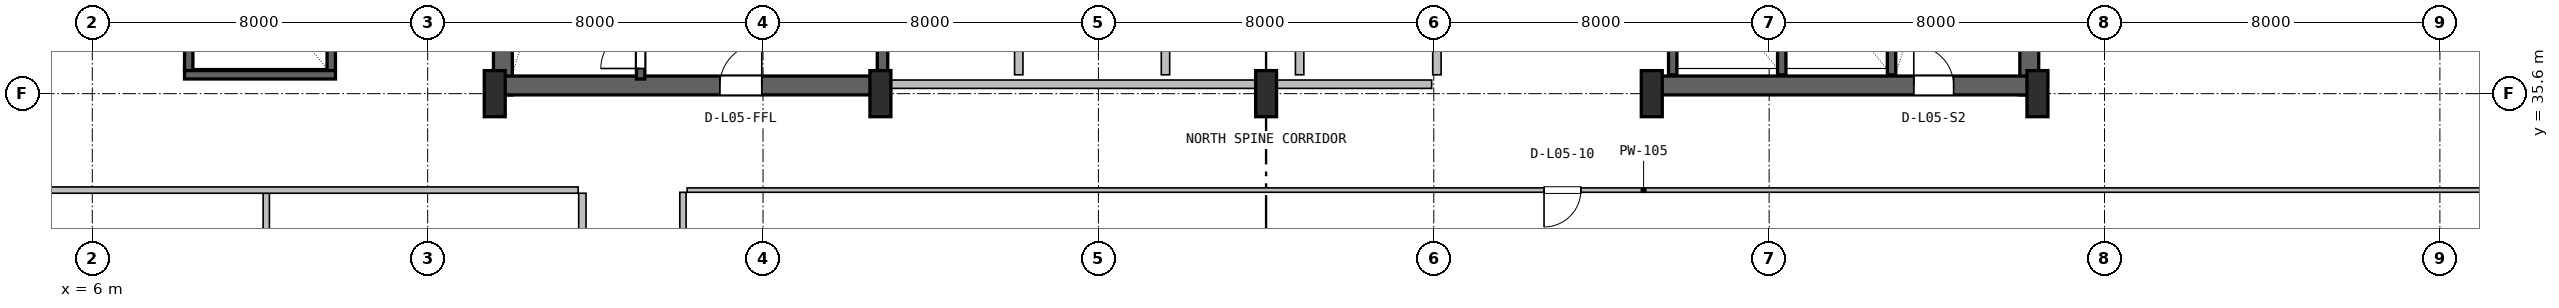
"""IFC4 building model, lengths in metres.
Left out: names, types, materials, properties, quantities, classifications, styles, units other than length and angle.
Written with IfcOpenShell. Run it as: python <this file> out.ifc"""

import sys

from ifc_helpers import new_model, si_unit, direction, frame, frame_2d, origin, origin_2d, place, context, subcontext, project, spatial, rectangle, i_section, extrude, source, transform, mapped, element, fill, save


model = new_model("IFC4")
c1 = context("Model", 3, precision=1e-05, world=origin(), true_north=direction((0.0, 1.0)))
c2 = subcontext(c1, "Body", "Model", "MODEL_VIEW")
j1 = project(units=[si_unit("LENGTHUNIT", "METRE"), si_unit("PLANEANGLEUNIT", "RADIAN")], contexts=[c1])
p1 = place(None, origin())
s1 = spatial("IfcSite", under=j1, at=p1, CompositionType="ELEMENT")
p2 = place(p1, origin())
s2 = spatial("IfcBuilding", under=s1, at=p2, CompositionType="ELEMENT")
p3 = place(p2, frame((0.0, 0.0, 27.6)))
s3 = spatial("IfcBuildingStorey", under=s2, at=p3, CompositionType="ELEMENT", Elevation=27.6)
for number, where, z_axis, x_axis in (
    (1, (15.795, 35.57, 0.0), (0.0, 0.0, 1.0), (0.0, 1.0, 0.0)),
    (2, (52.205, 35.57, 0.0), (0.0, 0.0, 1.0), (0.0, 1.0, 0.0)),
):
    element("IfcWall", number, at=place(p3, frame(where, z_axis=z_axis, x_axis=x_axis)), inside=s3, PredefinedType="SHEAR", context=c2, shape_type="SweptSolid", body=[
        extrude(rectangle(XDim=11.23, YDim=0.45, at=frame_2d((5.615, 0.0))), origin(), (0.0, 0.0, 1.0), 3.65),
    ])
p4 = place(p3, frame((15.57, 35.795, 0.0), z_axis=(0.0, 0.0, 1.0), x_axis=(1.0, 0.0, 0.0)))
e3 = element("IfcWall", 3, at=p4, inside=s3, PredefinedType="SHEAR", context=c2, shape_type="SweptSolid", body=[
    extrude(rectangle(XDim=9.23, YDim=0.45, at=frame_2d((4.615, 0.0))), origin(), (0.0, 0.0, 1.0), 3.65),
])
p5 = place(p4, frame((5.4, 0.0, 0.0)))
e4 = element("IfcOpeningElement", 4, at=p5, cuts=e3, PredefinedType="OPENING", context=c2, shape_type="SweptSolid", body=[
    extrude(rectangle(XDim=1.0, YDim=2.1, at=frame_2d((0.5, 1.05))), frame((0.0, 0.235, 0.0), z_axis=(0.0, -1.0, 0.0), x_axis=(1.0, 0.0, 0.0)), (0.0, 0.0, 1.0), 0.47),
])
p6 = place(p3, frame((43.2, 35.795, 0.0), z_axis=(0.0, 0.0, 1.0), x_axis=(1.0, 0.0, 0.0)))
e5 = element("IfcWall", 5, at=p6, inside=s3, PredefinedType="SHEAR", context=c2, shape_type="SweptSolid", body=[
    extrude(rectangle(XDim=9.23, YDim=0.45, at=frame_2d((4.615, 0.0))), origin(), (0.0, 0.0, 1.0), 3.65),
])
p7 = place(p6, frame((6.25, 0.0, 0.0)))
e6 = element("IfcOpeningElement", 6, at=p7, cuts=e5, PredefinedType="OPENING", context=c2, shape_type="SweptSolid", body=[
    extrude(rectangle(XDim=0.95, YDim=2.1, at=frame_2d((0.475, 1.05))), frame((0.0, 0.235, 0.0), z_axis=(0.0, -1.0, 0.0), x_axis=(1.0, 0.0, 0.0)), (0.0, 0.0, 1.0), 0.47),
])
m1 = source(origin(), c2, "Body", "SweptSolid", [
    extrude(i_section(OverallWidth=0.5, OverallDepth=1.1, WebThickness=0.018, FlangeThickness=0.032, FilletRadius=0.018, at=origin_2d()), origin(), (0.0, 0.0, 1.0), 3.9),
])
for number, where, z_axis, x_axis in (
    (7, (15.6, 35.6, 0.0), (0.0, 0.0, 1.0), (1.0, 0.0, 0.0)),
    (8, (24.8, 35.6, 0.0), (0.0, 0.0, 1.0), (1.0, 0.0, 0.0)),
    (9, (34.0, 35.6, 0.0), (0.0, 0.0, 1.0), (1.0, 0.0, 0.0)),
    (10, (43.2, 35.6, 0.0), (0.0, 0.0, 1.0), (1.0, 0.0, 0.0)),
    (11, (52.4, 35.6, 0.0), (0.0, 0.0, 1.0), (1.0, 0.0, 0.0)),
):
    element("IfcColumn", number, at=place(p3, frame(where, z_axis=z_axis, x_axis=x_axis)), inside=s3, PredefinedType="COLUMN", context=c2, shape_type="MappedRepresentation", body=[
        mapped(m1, transform((0.0, 0.0, 0.0), x_axis=(1.0, 0.0, 0.0), y_axis=(0.0, 1.0, 0.0), z_axis=(0.0, 0.0, 1.0), scale=1.0)),
    ])
p8 = place(p3, frame((19.08, 35.95, 0.0), z_axis=(0.0, 0.0, 1.0), x_axis=(0.0, 1.0, 0.0)))
e12 = element("IfcWall", 12, at=p8, inside=s3, PredefinedType="SHEAR", context=c2, shape_type="SweptSolid", body=[
    extrude(rectangle(XDim=9.65, YDim=0.2, at=frame_2d((4.825, 0.0))), origin(), (0.0, 0.0, 1.0), 3.65),
])
p9 = place(p8, frame((0.25, 0.0, 0.0)))
e13 = element("IfcOpeningElement", 13, at=p9, cuts=e12, PredefinedType="OPENING", context=c2, shape_type="SweptSolid", body=[
    extrude(rectangle(XDim=0.95, YDim=2.1, at=frame_2d((0.475, 1.05))), frame((0.0, 0.11, 0.0), z_axis=(0.0, -1.0, 0.0), x_axis=(1.0, 0.0, 0.0)), (0.0, 0.0, 1.0), 0.22),
])
p10 = place(p3, frame((24.85, 36.05, 0.0), z_axis=(0.0, 0.0, 1.0), x_axis=(0.0, 1.0, 0.0)))
e14 = element("IfcWall", 14, at=p10, inside=s3, PredefinedType="SHEAR", context=c2, shape_type="SweptSolid", body=[
    extrude(rectangle(XDim=10.45, YDim=0.25, at=frame_2d((5.225, 0.0))), origin(), (0.0, 0.0, 1.0), 3.65),
])
p11 = place(p3, frame((48.92, 36.05, 0.0), z_axis=(0.0, 0.0, 1.0), x_axis=(0.0, 1.0, 0.0)))
e15 = element("IfcWall", 15, at=p11, inside=s3, PredefinedType="SHEAR", context=c2, shape_type="SweptSolid", body=[
    extrude(rectangle(XDim=10.5, YDim=0.2, at=frame_2d((5.25, 0.0))), origin(), (0.0, 0.0, 1.0), 3.65),
])
for number, where, z_axis, x_axis in (
    (16, (43.7, 36.05, 0.0), (0.0, 0.0, 1.0), (0.0, 1.0, 0.0)),
    (17, (46.3, 36.05, 0.0), (0.0, 0.0, 1.0), (0.0, 1.0, 0.0)),
):
    element("IfcWall", number, at=place(p3, frame(where, z_axis=z_axis, x_axis=x_axis)), inside=s3, PredefinedType="SHEAR", context=c2, shape_type="SweptSolid", body=[
        extrude(rectangle(XDim=3.05, YDim=0.2, at=frame_2d((1.525, 0.0))), origin(), (0.0, 0.0, 1.0), 3.65),
    ])
for number, where, z_axis, x_axis in (
    (18, (8.3, 36.15, 0.0), (0.0, 0.0, 1.0), (0.0, 1.0, 0.0)),
    (19, (11.7, 36.15, 0.0), (0.0, 0.0, 1.0), (0.0, 1.0, 0.0)),
):
    element("IfcWall", number, at=place(p3, frame(where, z_axis=z_axis, x_axis=x_axis)), inside=s3, PredefinedType="SHEAR", context=c2, shape_type="SweptSolid", body=[
        extrude(rectangle(XDim=3.85, YDim=0.2, at=frame_2d((1.925, 0.0))), origin(), (0.0, 0.0, 1.0), 3.65),
    ])
p12 = place(p3, frame((8.2, 36.05, 0.0), z_axis=(0.0, 0.0, 1.0), x_axis=(1.0, 0.0, 0.0)))
e20 = element("IfcWall", 20, at=p12, inside=s3, PredefinedType="SHEAR", context=c2, shape_type="SweptSolid", body=[
    extrude(rectangle(XDim=3.6, YDim=0.2, at=frame_2d((1.8, 0.0))), origin(), (0.0, 0.0, 1.0), 3.65),
])
p13 = place(p3, frame((25.0, 35.825, 0.0), z_axis=(0.0, 0.0, 1.0), x_axis=(1.0, 0.0, 0.0)))
e21 = element("IfcWall", 21, at=p13, inside=s3, PredefinedType="SOLIDWALL", context=c2, shape_type="SweptSolid", body=[
    extrude(rectangle(XDim=12.95, YDim=0.2, at=frame_2d((6.475, 0.0))), origin(), (0.0, 0.0, 1.0), 2.425),
])
for number, where, z_axis, x_axis in (
    (22, (28.1, 36.05, 0.0), (0.0, 0.0, 1.0), (0.0, 1.0, 0.0)),
    (23, (31.6, 36.05, 0.0), (0.0, 0.0, 1.0), (0.0, 1.0, 0.0)),
):
    element("IfcWall", number, at=place(p3, frame(where, z_axis=z_axis, x_axis=x_axis)), inside=s3, PredefinedType="PLUMBINGWALL", context=c2, shape_type="SweptSolid", body=[
        extrude(rectangle(XDim=3.1, YDim=0.2, at=frame_2d((1.55, 0.0))), origin(), (0.0, 0.0, 1.0), 3.63),
    ])
for number, where, z_axis, x_axis in (
    (24, (34.8, 36.05, 0.0), (0.0, 0.0, 1.0), (0.0, 1.0, 0.0)),
    (25, (38.075, 36.05, 0.0), (0.0, 0.0, 1.0), (0.0, 1.0, 0.0)),
):
    element("IfcWall", number, at=place(p3, frame(where, z_axis=z_axis, x_axis=x_axis)), inside=s3, PredefinedType="SOLIDWALL", context=c2, shape_type="SweptSolid", body=[
        extrude(rectangle(XDim=3.1, YDim=0.2, at=frame_2d((1.55, 0.0))), origin(), (0.0, 0.0, 1.0), 3.63),
    ])
p14 = place(p3, frame((10.15, 13.745, 0.0), z_axis=(0.0, 0.0, 1.0), x_axis=(0.0, 1.0, 0.0)))
e26 = element("IfcWall", 26, at=p14, inside=s3, PredefinedType="PARTITIONING", context=c2, shape_type="SweptSolid", body=[
    extrude(rectangle(XDim=19.48, YDim=0.15, at=frame_2d((9.74, 0.0))), origin(), (0.0, 0.0, 1.0), 3.322),
])
p15 = place(p3, frame((2.18, 33.3, 0.0), z_axis=(0.0, 0.0, 1.0), x_axis=(1.0, 0.0, 0.0)))
e27 = element("IfcWall", 27, at=p15, inside=s3, PredefinedType="PARTITIONING", context=c2, shape_type="SweptSolid", body=[
    extrude(rectangle(XDim=15.41, YDim=0.15, at=frame_2d((7.705, 0.0))), origin(), (0.0, 0.0, 1.0), 3.208),
])
p16 = place(p3, frame((17.69, 13.745, 0.0), z_axis=(0.0, 0.0, 1.0), x_axis=(0.0, 1.0, 0.0)))
e28 = element("IfcWall", 28, at=p16, inside=s3, PredefinedType="PARTITIONING", context=c2, shape_type="SweptSolid", body=[
    extrude(rectangle(XDim=19.48, YDim=0.175, at=frame_2d((9.74, 0.0))), origin(), (0.0, 0.0, 1.0), 3.322),
])
p17 = place(p16, frame((9.215, 0.0, 0.0)))
e29 = element("IfcOpeningElement", 29, at=p17, cuts=e28, PredefinedType="OPENING", context=c2, shape_type="SweptSolid", body=[
    extrude(rectangle(XDim=1.05, YDim=2.1, at=frame_2d((0.525, 1.05))), frame((0.0, 0.098, 0.0), z_axis=(0.0, -1.0, 0.0), x_axis=(1.0, 0.0, 0.0)), (0.0, 0.0, 1.0), 0.195),
])
p18 = place(p3, frame((20.09, 2.55, 0.0), z_axis=(0.0, 0.0, 1.0), x_axis=(0.0, 1.0, 0.0)))
e30 = element("IfcWall", 30, at=p18, inside=s3, PredefinedType="PARTITIONING", context=c2, shape_type="SweptSolid", body=[
    extrude(rectangle(XDim=30.697, YDim=0.15, at=frame_2d((15.349, 0.0))), origin(), (0.0, 0.0, 1.0), 3.322),
])
p19 = place(p18, frame((5.945, 0.0, 0.0)))
e31 = element("IfcOpeningElement", 31, at=p19, cuts=e30, PredefinedType="OPENING", context=c2, shape_type="SweptSolid", body=[
    extrude(rectangle(XDim=0.88, YDim=2.06, at=frame_2d((0.44, 1.03))), frame((0.0, 0.085, 0.0), z_axis=(0.0, -1.0, 0.0), x_axis=(1.0, 0.0, 0.0)), (0.0, 0.0, 1.0), 0.17),
])
p20 = place(p18, frame((16.045, 0.0, 0.0)))
e32 = element("IfcOpeningElement", 32, at=p20, cuts=e30, PredefinedType="OPENING", context=c2, shape_type="SweptSolid", body=[
    extrude(rectangle(XDim=1.0, YDim=2.1, at=frame_2d((0.5, 1.05))), frame((0.0, 0.085, 0.0), z_axis=(0.0, -1.0, 0.0), x_axis=(1.0, 0.0, 0.0)), (0.0, 0.0, 1.0), 0.17),
])
p21 = place(p3, frame((20.19, 33.3, 0.0), z_axis=(0.0, 0.0, 1.0), x_axis=(1.0, 0.0, 0.0)))
e33 = element("IfcWall", 33, at=p21, inside=s3, PredefinedType="PARTITIONING", context=c2, shape_type="SweptSolid", body=[
    extrude(rectangle(XDim=45.63, YDim=0.105, at=frame_2d((22.815, 0.0))), origin(), (0.0, 0.0, 1.0), 2.852),
])
p22 = place(p21, frame((20.44, 0.0, 0.0)))
e34 = element("IfcOpeningElement", 34, at=p22, cuts=e33, PredefinedType="OPENING", context=c2, shape_type="SweptSolid", body=[
    extrude(rectangle(XDim=0.88, YDim=2.06, at=frame_2d((0.44, 1.03))), frame((0.0, 0.062, 0.0), z_axis=(0.0, -1.0, 0.0), x_axis=(1.0, 0.0, 0.0)), (0.0, 0.0, 1.0), 0.125),
])
m2 = source(origin(), c2, "Body", "SweptSolid", [
    extrude(rectangle(XDim=0.95, YDim=2.1, at=frame_2d((0.475, 1.05))), frame((0.0, 0.025, 0.0), z_axis=(0.0, -1.0, 0.0), x_axis=(1.0, 0.0, 0.0)), (0.0, 0.0, 1.0), 0.05),
])
p23 = place(p9, origin())
e35 = element("IfcDoor", 35, at=p23, inside=s3, OperationType="SINGLE_SWING_LEFT", PredefinedType="DOOR", context=c2, shape_type="MappedRepresentation", body=[
    mapped(m2, transform((0.0, 0.0, 0.0), x_axis=(1.0, 0.0, 0.0), y_axis=(0.0, 1.0, 0.0), z_axis=(0.0, 0.0, 1.0), scale=1.0)),
])
fill(e13, e35)
m3 = source(origin(), c2, "Body", "SweptSolid", [
    extrude(rectangle(XDim=1.0, YDim=2.1, at=frame_2d((0.5, 1.05))), frame((0.0, 0.025, 0.0), z_axis=(0.0, -1.0, 0.0), x_axis=(1.0, 0.0, 0.0)), (0.0, 0.0, 1.0), 0.05),
])
p24 = place(p5, origin())
e36 = element("IfcDoor", 36, at=p24, inside=s3, OperationType="SINGLE_SWING_RIGHT", PredefinedType="DOOR", context=c2, shape_type="MappedRepresentation", body=[
    mapped(m3, transform((0.0, 0.0, 0.0), x_axis=(1.0, 0.0, 0.0), y_axis=(0.0, 1.0, 0.0), z_axis=(0.0, 0.0, 1.0), scale=1.0)),
])
fill(e4, e36)
p25 = place(p7, origin())
e37 = element("IfcDoor", 37, at=p25, inside=s3, OperationType="SINGLE_SWING_LEFT", PredefinedType="DOOR", context=c2, shape_type="MappedRepresentation", body=[
    mapped(m2, transform((0.0, 0.0, 0.0), x_axis=(1.0, 0.0, 0.0), y_axis=(0.0, 1.0, 0.0), z_axis=(0.0, 0.0, 1.0), scale=1.0)),
])
fill(e6, e37)
m4 = source(origin(), c2, "Body", "SweptSolid", [
    extrude(rectangle(XDim=0.88, YDim=2.06, at=frame_2d((0.44, 1.03))), frame((0.0, 0.025, 0.0), z_axis=(0.0, -1.0, 0.0), x_axis=(1.0, 0.0, 0.0)), (0.0, 0.0, 1.0), 0.05),
])
p26 = place(p22, frame((0.88, 0.0, 0.0), z_axis=(0.0, 0.0, 1.0), x_axis=(-1.0, 0.0, 0.0)))
e38 = element("IfcDoor", 38, at=p26, inside=s3, OperationType="SINGLE_SWING_LEFT", PredefinedType="DOOR", context=c2, shape_type="MappedRepresentation", body=[
    mapped(m4, transform((0.0, 0.0, 0.0), x_axis=(1.0, 0.0, 0.0), y_axis=(0.0, 1.0, 0.0), z_axis=(0.0, 0.0, 1.0), scale=1.0)),
])
fill(e34, e38)
save(model, sys.argv[1])
